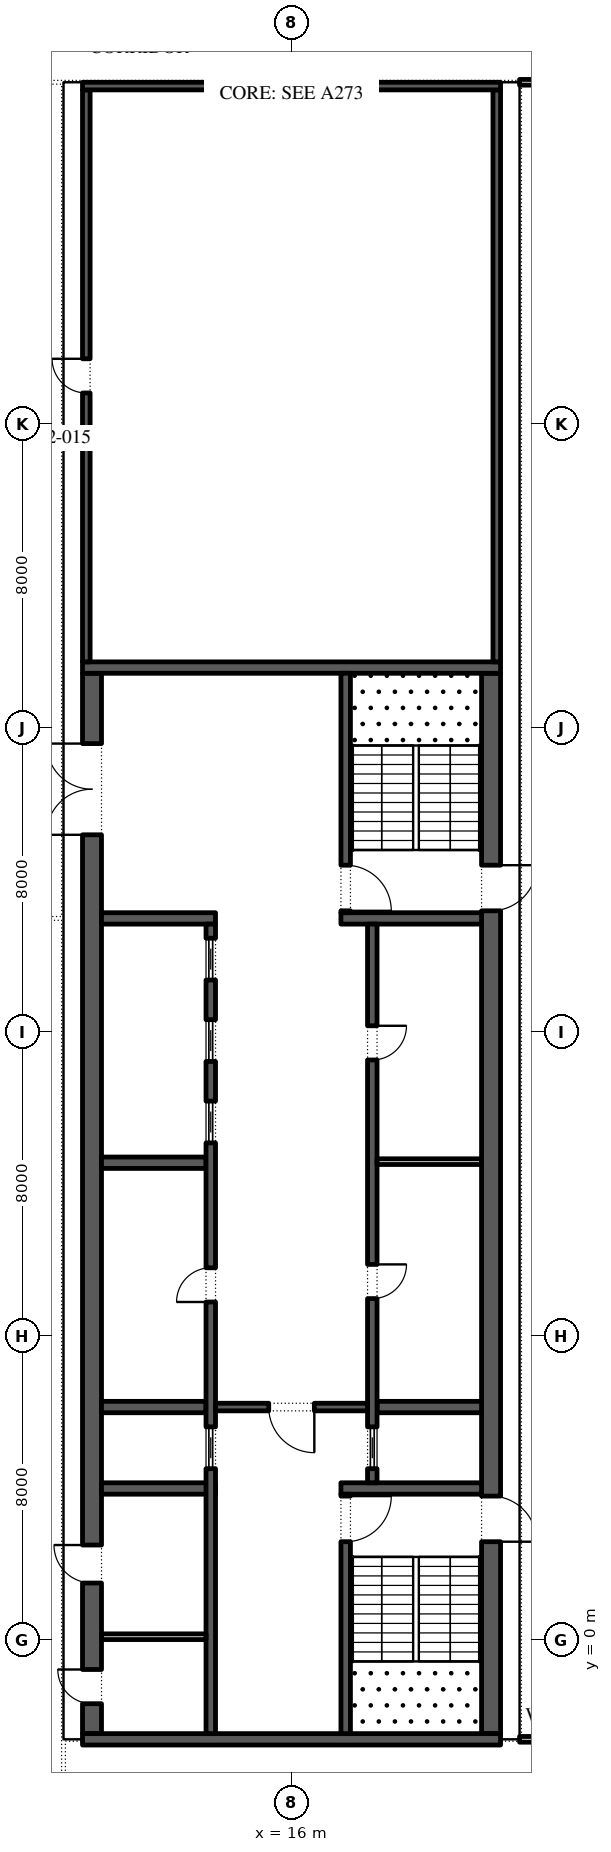
"""IFC4 building model, lengths in metres.
Left out: names, types, materials, properties, quantities, classifications, styles, units other than length and angle.
Written with IfcOpenShell. Run it as: python <this file> out.ifc"""

import sys

from ifc_helpers import new_model, si_unit, direction, frame, frame_2d, origin, place, context, subcontext, project, spatial, rectangle, extrude, element, fill, save


model = new_model("IFC4")
c1 = context("Model", 3, precision=1e-05, world=origin(), true_north=direction((0.0, 1.0)))
c2 = subcontext(c1, "Body", "Model", "MODEL_VIEW")
j1 = project(units=[si_unit("LENGTHUNIT", "METRE"), si_unit("PLANEANGLEUNIT", "RADIAN")], contexts=[c1])
p1 = place(None, origin())
s1 = spatial("IfcSite", under=j1, at=p1, CompositionType="ELEMENT")
p2 = place(p1, origin())
s2 = spatial("IfcBuilding", under=s1, at=p2, CompositionType="ELEMENT")
p3 = place(p2, frame((0.0, 0.0, 321.6)))
s3 = spatial("IfcBuildingStorey", under=s2, at=p3, CompositionType="ELEMENT", Elevation=321.6)
p4 = place(p3, frame((21.25, -2.45, 0.0), z_axis=(0.0, 0.0, 1.0), x_axis=(0.0, 1.0, 0.0)))
e1 = element("IfcWall", 1, at=p4, inside=s3, PredefinedType="SHEAR", context=c2, shape_type="SweptSolid", body=[
    extrude(rectangle(XDim=27.9, YDim=0.5, at=frame_2d((13.95, 0.0))), origin(), (0.0, 0.0, 1.0), 4.0),
])
p5 = place(p4, frame((5.05, 0.0, 0.0)))
e2 = element("IfcOpeningElement", 2, at=p5, cuts=e1, PredefinedType="OPENING", context=c2, shape_type="SweptSolid", body=[
    extrude(rectangle(XDim=1.2, YDim=2.1, at=frame_2d((0.6, 1.05))), frame((0.0, 0.26, 0.0), z_axis=(0.0, -1.0, 0.0), x_axis=(1.0, 0.0, 0.0)), (0.0, 0.0, 1.0), 0.52),
])
p6 = place(p4, frame((21.65, 0.0, 0.0)))
e3 = element("IfcOpeningElement", 3, at=p6, cuts=e1, PredefinedType="OPENING", context=c2, shape_type="SweptSolid", body=[
    extrude(rectangle(XDim=1.2, YDim=2.1, at=frame_2d((0.6, 1.05))), frame((0.0, 0.26, 0.0), z_axis=(0.0, -1.0, 0.0), x_axis=(1.0, 0.0, 0.0)), (0.0, 0.0, 1.0), 0.52),
])
p7 = place(p3, frame((10.75, -2.45, 0.0), z_axis=(0.0, 0.0, 1.0), x_axis=(0.0, 1.0, 0.0)))
e4 = element("IfcWall", 4, at=p7, inside=s3, PredefinedType="SHEAR", context=c2, shape_type="SweptSolid", body=[
    extrude(rectangle(XDim=27.9, YDim=0.5, at=frame_2d((13.95, 0.0))), origin(), (0.0, 0.0, 1.0), 4.0),
])
p8 = place(p7, frame((23.65, 0.0, 0.0)))
e5 = element("IfcOpeningElement", 5, at=p8, cuts=e4, PredefinedType="OPENING", context=c2, shape_type="SweptSolid", body=[
    extrude(rectangle(XDim=2.4, YDim=2.1, at=frame_2d((1.2, 1.05))), frame((0.0, 0.26, 0.0), z_axis=(0.0, -1.0, 0.0), x_axis=(1.0, 0.0, 0.0)), (0.0, 0.0, 1.0), 0.52),
])
p9 = place(p7, frame((0.788, 0.0, 0.0)))
e6 = element("IfcOpeningElement", 6, at=p9, cuts=e4, PredefinedType="OPENING", context=c2, shape_type="SweptSolid", body=[
    extrude(rectangle(XDim=0.9, YDim=2.1, at=frame_2d((0.45, 1.05))), frame((0.0, 0.26, 0.0), z_axis=(0.0, -1.0, 0.0), x_axis=(1.0, 0.0, 0.0)), (0.0, 0.0, 1.0), 0.52),
])
p10 = place(p7, frame((3.962, 0.0, 0.0)))
e7 = element("IfcOpeningElement", 7, at=p10, cuts=e4, PredefinedType="OPENING", context=c2, shape_type="SweptSolid", body=[
    extrude(rectangle(XDim=1.0, YDim=2.1, at=frame_2d((0.5, 1.05))), frame((0.0, 0.26, 0.0), z_axis=(0.0, -1.0, 0.0), x_axis=(1.0, 0.0, 0.0)), (0.0, 0.0, 1.0), 0.52),
])
for number, where, z_axis, x_axis in (
    (8, (10.5, -2.6, 0.0), (0.0, 0.0, 1.0), (1.0, 0.0, 0.0)),
    (9, (10.5, 25.6, 0.0), (0.0, 0.0, 1.0), (1.0, 0.0, 0.0)),
):
    element("IfcWall", number, at=place(p3, frame(where, z_axis=z_axis, x_axis=x_axis)), inside=s3, PredefinedType="SHEAR", context=c2, shape_type="SweptSolid", body=[
        extrude(rectangle(XDim=11.0, YDim=0.3, at=frame_2d((5.5, 0.0))), origin(), (0.0, 0.0, 1.0), 4.0),
    ])
p11 = place(p3, frame((17.3, 4.0, 0.0), z_axis=(0.0, 0.0, 1.0), x_axis=(1.0, 0.0, 0.0)))
e10 = element("IfcWall", 10, at=p11, inside=s3, PredefinedType="SHEAR", context=c2, shape_type="SweptSolid", body=[
    extrude(rectangle(XDim=3.7, YDim=0.3, at=frame_2d((1.85, 0.0))), origin(), (0.0, 0.0, 1.0), 4.0),
])
p12 = place(p3, frame((17.425, -2.45, 0.0), z_axis=(0.0, 0.0, 1.0), x_axis=(0.0, 1.0, 0.0)))
e11 = element("IfcWall", 11, at=p12, inside=s3, PredefinedType="SHEAR", context=c2, shape_type="SweptSolid", body=[
    extrude(rectangle(XDim=6.3, YDim=0.25, at=frame_2d((3.15, 0.0))), origin(), (0.0, 0.0, 1.0), 4.0),
])
p13 = place(p12, frame((5.05, 0.0, 0.0)))
e12 = element("IfcOpeningElement", 12, at=p13, cuts=e11, PredefinedType="OPENING", context=c2, shape_type="SweptSolid", body=[
    extrude(rectangle(XDim=1.2, YDim=2.1, at=frame_2d((0.6, 1.05))), frame((0.0, 0.135, 0.0), z_axis=(0.0, -1.0, 0.0), x_axis=(1.0, 0.0, 0.0)), (0.0, 0.0, 1.0), 0.27),
])
p14 = place(p3, frame((17.3, 19.0, 0.0), z_axis=(0.0, 0.0, 1.0), x_axis=(1.0, 0.0, 0.0)))
e13 = element("IfcWall", 13, at=p14, inside=s3, PredefinedType="SHEAR", context=c2, shape_type="SweptSolid", body=[
    extrude(rectangle(XDim=3.7, YDim=0.3, at=frame_2d((1.85, 0.0))), origin(), (0.0, 0.0, 1.0), 4.0),
])
p15 = place(p3, frame((17.425, 19.15, 0.0), z_axis=(0.0, 0.0, 1.0), x_axis=(0.0, 1.0, 0.0)))
e14 = element("IfcWall", 14, at=p15, inside=s3, PredefinedType="SHEAR", context=c2, shape_type="SweptSolid", body=[
    extrude(rectangle(XDim=6.3, YDim=0.25, at=frame_2d((3.15, 0.0))), origin(), (0.0, 0.0, 1.0), 4.0),
])
p16 = place(p15, frame((0.05, 0.0, 0.0)))
e15 = element("IfcOpeningElement", 15, at=p16, cuts=e14, PredefinedType="OPENING", context=c2, shape_type="SweptSolid", body=[
    extrude(rectangle(XDim=1.2, YDim=2.1, at=frame_2d((0.6, 1.05))), frame((0.0, 0.135, 0.0), z_axis=(0.0, -1.0, 0.0), x_axis=(1.0, 0.0, 0.0)), (0.0, 0.0, 1.0), 0.27),
])
p17 = place(p3, frame((18.25, 6.143, 0.0), z_axis=(0.0, 0.0, 1.0), x_axis=(1.0, 0.0, 0.0)))
e16 = element("IfcWall", 16, at=p17, inside=s3, PredefinedType="SHEAR", context=c2, shape_type="SweptSolid", body=[
    extrude(rectangle(XDim=2.75, YDim=0.3, at=frame_2d((1.375, 0.0))), origin(), (0.0, 0.0, 1.0), 4.0),
])
p18 = place(p3, frame((18.125, 4.15, 0.0), z_axis=(0.0, 0.0, 1.0), x_axis=(0.0, 1.0, 0.0)))
e17 = element("IfcWall", 17, at=p18, inside=s3, PredefinedType="SHEAR", context=c2, shape_type="SweptSolid", body=[
    extrude(rectangle(XDim=14.7, YDim=0.25, at=frame_2d((7.35, 0.0))), origin(), (0.0, 0.0, 1.0), 4.0),
])
p19 = place(p18, frame((4.846, 0.0, 0.0)))
e18 = element("IfcOpeningElement", 18, at=p19, cuts=e17, PredefinedType="OPENING", context=c2, shape_type="SweptSolid", body=[
    extrude(rectangle(XDim=0.9, YDim=2.1, at=frame_2d((0.45, 1.05))), frame((0.0, 0.135, 0.0), z_axis=(0.0, -1.0, 0.0), x_axis=(1.0, 0.0, 0.0)), (0.0, 0.0, 1.0), 0.27),
])
p20 = place(p18, frame((11.125, 0.0, 0.0)))
e19 = element("IfcOpeningElement", 19, at=p20, cuts=e17, PredefinedType="OPENING", context=c2, shape_type="SweptSolid", body=[
    extrude(rectangle(XDim=0.9, YDim=2.1, at=frame_2d((0.45, 1.05))), frame((0.0, 0.135, 0.0), z_axis=(0.0, -1.0, 0.0), x_axis=(1.0, 0.0, 0.0)), (0.0, 0.0, 1.0), 0.27),
])
p21 = place(p18, frame((0.371, 0.0, 0.0)))
e20 = element("IfcOpeningElement", 20, at=p21, cuts=e17, PredefinedType="OPENING", context=c2, shape_type="SweptSolid", body=[
    extrude(rectangle(XDim=1.1, YDim=2.1, at=frame_2d((0.55, 1.05))), frame((0.0, 0.135, 0.0), z_axis=(0.0, -1.0, 0.0), x_axis=(1.0, 0.0, 0.0)), (0.0, 0.0, 1.0), 0.27),
])
p22 = place(p3, frame((18.25, 12.6, 0.0), z_axis=(0.0, 0.0, 1.0), x_axis=(1.0, 0.0, 0.0)))
e21 = element("IfcWall", 21, at=p22, inside=s3, PredefinedType="PARTITIONING", context=c2, shape_type="SweptSolid", body=[
    extrude(rectangle(XDim=2.75, YDim=0.15, at=frame_2d((1.375, 0.0))), origin(), (0.0, 0.0, 1.0), 4.0),
])
p23 = place(p3, frame((11.0, 4.0, 0.0), z_axis=(0.0, 0.0, 1.0), x_axis=(1.0, 0.0, 0.0)))
e22 = element("IfcWall", 22, at=p23, inside=s3, PredefinedType="SHEAR", context=c2, shape_type="SweptSolid", body=[
    extrude(rectangle(XDim=3.0, YDim=0.3, at=frame_2d((1.5, 0.0))), origin(), (0.0, 0.0, 1.0), 4.0),
])
for number, where, z_axis, x_axis in (
    (23, (11.0, 6.143, 0.0), (0.0, 0.0, 1.0), (1.0, 0.0, 0.0)),
    (24, (11.0, 12.571, 0.0), (0.0, 0.0, 1.0), (1.0, 0.0, 0.0)),
):
    element("IfcWall", number, at=place(p3, frame(where, z_axis=z_axis, x_axis=x_axis)), inside=s3, PredefinedType="SHEAR", context=c2, shape_type="SweptSolid", body=[
        extrude(rectangle(XDim=2.75, YDim=0.3, at=frame_2d((1.375, 0.0))), origin(), (0.0, 0.0, 1.0), 4.0),
    ])
p24 = place(p3, frame((11.0, 19.0, 0.0), z_axis=(0.0, 0.0, 1.0), x_axis=(1.0, 0.0, 0.0)))
e25 = element("IfcWall", 25, at=p24, inside=s3, PredefinedType="SHEAR", context=c2, shape_type="SweptSolid", body=[
    extrude(rectangle(XDim=3.0, YDim=0.3, at=frame_2d((1.5, 0.0))), origin(), (0.0, 0.0, 1.0), 4.0),
])
p25 = place(p3, frame((13.875, -2.45, 0.0), z_axis=(0.0, 0.0, 1.0), x_axis=(0.0, 1.0, 0.0)))
e26 = element("IfcWall", 26, at=p25, inside=s3, PredefinedType="SHEAR", context=c2, shape_type="SweptSolid", body=[
    extrude(rectangle(XDim=21.3, YDim=0.25, at=frame_2d((10.65, 0.0))), origin(), (0.0, 0.0, 1.0), 4.0),
])
p26 = place(p25, frame((11.357, 0.0, 0.0)))
e27 = element("IfcOpeningElement", 27, at=p26, cuts=e26, PredefinedType="OPENING", context=c2, shape_type="SweptSolid", body=[
    extrude(rectangle(XDim=0.9, YDim=2.1, at=frame_2d((0.45, 1.05))), frame((0.0, 0.135, 0.0), z_axis=(0.0, -1.0, 0.0), x_axis=(1.0, 0.0, 0.0)), (0.0, 0.0, 1.0), 0.27),
])
p27 = place(p25, frame((6.971, 0.0, 0.0)))
e28 = element("IfcOpeningElement", 28, at=p27, cuts=e26, PredefinedType="OPENING", context=c2, shape_type="SweptSolid", body=[
    extrude(rectangle(XDim=1.1, YDim=2.1, at=frame_2d((0.55, 1.05))), frame((0.0, 0.135, 0.0), z_axis=(0.0, -1.0, 0.0), x_axis=(1.0, 0.0, 0.0)), (0.0, 0.0, 1.0), 0.27),
])
p28 = place(p25, frame((15.543, 0.0, 0.0)))
e29 = element("IfcOpeningElement", 29, at=p28, cuts=e26, PredefinedType="OPENING", context=c2, shape_type="SweptSolid", body=[
    extrude(rectangle(XDim=1.1, YDim=2.1, at=frame_2d((0.55, 1.05))), frame((0.0, 0.135, 0.0), z_axis=(0.0, -1.0, 0.0), x_axis=(1.0, 0.0, 0.0)), (0.0, 0.0, 1.0), 0.27),
])
p29 = place(p25, frame((17.686, 0.0, 0.0)))
e30 = element("IfcOpeningElement", 30, at=p29, cuts=e26, PredefinedType="OPENING", context=c2, shape_type="SweptSolid", body=[
    extrude(rectangle(XDim=1.1, YDim=2.1, at=frame_2d((0.55, 1.05))), frame((0.0, 0.135, 0.0), z_axis=(0.0, -1.0, 0.0), x_axis=(1.0, 0.0, 0.0)), (0.0, 0.0, 1.0), 0.27),
])
p30 = place(p25, frame((19.829, 0.0, 0.0)))
e31 = element("IfcOpeningElement", 31, at=p30, cuts=e26, PredefinedType="OPENING", context=c2, shape_type="SweptSolid", body=[
    extrude(rectangle(XDim=1.1, YDim=2.1, at=frame_2d((0.55, 1.05))), frame((0.0, 0.135, 0.0), z_axis=(0.0, -1.0, 0.0), x_axis=(1.0, 0.0, 0.0)), (0.0, 0.0, 1.0), 0.27),
])
p31 = place(p3, frame((14.0, 6.143, 0.0), z_axis=(0.0, 0.0, 1.0), x_axis=(1.0, 0.0, 0.0)))
e32 = element("IfcWall", 32, at=p31, inside=s3, PredefinedType="SHEAR", context=c2, shape_type="SweptSolid", body=[
    extrude(rectangle(XDim=4.0, YDim=0.2, at=frame_2d((2.0, 0.0))), origin(), (0.0, 0.0, 1.0), 4.0),
])
p32 = place(p31, frame((1.4, 0.0, 0.0)))
e33 = element("IfcOpeningElement", 33, at=p32, cuts=e32, PredefinedType="OPENING", context=c2, shape_type="SweptSolid", body=[
    extrude(rectangle(XDim=1.2, YDim=2.1, at=frame_2d((0.6, 1.05))), frame((0.0, 0.11, 0.0), z_axis=(0.0, -1.0, 0.0), x_axis=(1.0, 0.0, 0.0)), (0.0, 0.0, 1.0), 0.22),
])
p33 = place(p3, frame((11.0, 0.1, 0.0), z_axis=(0.0, 0.0, 1.0), x_axis=(1.0, 0.0, 0.0)))
e34 = element("IfcWall", 34, at=p33, inside=s3, PredefinedType="PARTITIONING", context=c2, shape_type="SweptSolid", body=[
    extrude(rectangle(XDim=2.75, YDim=0.15, at=frame_2d((1.375, 0.0))), origin(), (0.0, 0.0, 1.0), 4.0),
])
p34 = place(p3, frame((21.4, 25.75, 0.0), z_axis=(0.0, 0.0, 1.0), x_axis=(0.0, 1.0, 0.0)))
e35 = element("IfcWall", 35, at=p34, inside=s3, PredefinedType="SHEAR", context=c2, shape_type="SweptSolid", body=[
    extrude(rectangle(XDim=15.05, YDim=0.2, at=frame_2d((7.525, 0.0))), origin(), (0.0, 0.0, 1.0), 4.0),
])
p35 = place(p3, frame((10.6, 25.75, 0.0), z_axis=(0.0, 0.0, 1.0), x_axis=(0.0, 1.0, 0.0)))
e36 = element("IfcWall", 36, at=p35, inside=s3, PredefinedType="SHEAR", context=c2, shape_type="SweptSolid", body=[
    extrude(rectangle(XDim=15.05, YDim=0.2, at=frame_2d((7.525, 0.0))), origin(), (0.0, 0.0, 1.0), 4.0),
])
p36 = place(p35, frame((7.075, 0.0, 0.0)))
e37 = element("IfcOpeningElement", 37, at=p36, cuts=e36, PredefinedType="OPENING", context=c2, shape_type="SweptSolid", body=[
    extrude(rectangle(XDim=0.9, YDim=2.1, at=frame_2d((0.45, 1.05))), frame((0.0, 0.11, 0.0), z_axis=(0.0, -1.0, 0.0), x_axis=(1.0, 0.0, 0.0)), (0.0, 0.0, 1.0), 0.22),
])
p37 = place(p3, frame((10.5, 40.9, 0.0), z_axis=(0.0, 0.0, 1.0), x_axis=(1.0, 0.0, 0.0)))
e38 = element("IfcWall", 38, at=p37, inside=s3, PredefinedType="SHEAR", context=c2, shape_type="SweptSolid", body=[
    extrude(rectangle(XDim=11.0, YDim=0.2, at=frame_2d((5.5, 0.0))), origin(), (0.0, 0.0, 1.0), 4.0),
])
p38 = place(p3, frame((22.0, -2.6, 0.0), z_axis=(0.0, 0.0, 1.0), x_axis=(1.0, 0.0, 0.0)))
e39 = element("IfcWall", 39, at=p38, inside=s3, PredefinedType="PARTITIONING", context=c2, shape_type="SweptSolid", body=[
    extrude(rectangle(XDim=2.25, YDim=0.15, at=frame_2d((1.125, 0.0))), origin(), (0.0, 0.0, 1.0), 4.0),
])
p39 = place(p3, frame((26.05, 41.0, 0.0), z_axis=(0.0, 0.0, 1.0), x_axis=(-1.0, 0.0, 0.0)))
e40 = element("IfcWall", 40, at=p39, inside=s3, PredefinedType="PARTITIONING", context=c2, shape_type="SweptSolid", body=[
    extrude(rectangle(XDim=4.05, YDim=0.15, at=frame_2d((2.025, 0.0))), origin(), (0.0, 0.0, 1.0), 4.0),
])
p40 = place(p39, frame((0.9, 0.0, 0.0)))
e41 = element("IfcOpeningElement", 41, at=p40, cuts=e40, PredefinedType="OPENING", context=c2, shape_type="SweptSolid", body=[
    extrude(rectangle(XDim=1.0, YDim=2.1, at=frame_2d((0.5, 1.05))), frame((0.0, 0.085, 0.0), z_axis=(0.0, -1.0, 0.0), x_axis=(1.0, 0.0, 0.0)), (0.0, 0.0, 1.0), 0.17),
])
p41 = place(p19, frame((0.9, -0.2, 0.0), z_axis=(0.0, 0.0, 1.0), x_axis=(-1.0, 0.0, 0.0)))
e42 = element("IfcDoor", 42, at=p41, inside=s3, OperationType="SINGLE_SWING_RIGHT", PredefinedType="DOOR", context=c2, shape_type="SweptSolid", body=[
    extrude(rectangle(XDim=0.9, YDim=2.1, at=frame_2d((0.45, 1.05))), frame((0.0, -0.075, 0.0), z_axis=(0.0, -1.0, 0.0), x_axis=(1.0, 0.0, 0.0)), (0.0, 0.0, 1.0), 0.05),
])
fill(e18, e42)
p42 = place(p20, frame((0.9, -0.2, 0.0), z_axis=(0.0, 0.0, 1.0), x_axis=(-1.0, 0.0, 0.0)))
e43 = element("IfcDoor", 43, at=p42, inside=s3, OperationType="SINGLE_SWING_RIGHT", PredefinedType="DOOR", context=c2, shape_type="SweptSolid", body=[
    extrude(rectangle(XDim=0.9, YDim=2.1, at=frame_2d((0.45, 1.05))), frame((0.0, -0.075, 0.0), z_axis=(0.0, -1.0, 0.0), x_axis=(1.0, 0.0, 0.0)), (0.0, 0.0, 1.0), 0.05),
])
fill(e19, e43)
p43 = place(p21, origin())
e44 = element("IfcDoor", 44, at=p43, inside=s3, OperationType="SLIDING_TO_LEFT", PredefinedType="DOOR", context=c2, shape_type="SweptSolid", body=[
    extrude(rectangle(XDim=1.1, YDim=2.1, at=frame_2d((0.55, 1.05))), frame((0.0, 0.025, 0.0), z_axis=(0.0, -1.0, 0.0), x_axis=(1.0, 0.0, 0.0)), (0.0, 0.0, 1.0), 0.05),
])
fill(e20, e44)
p44 = place(p26, origin())
e45 = element("IfcDoor", 45, at=p44, inside=s3, OperationType="SINGLE_SWING_RIGHT", PredefinedType="DOOR", context=c2, shape_type="SweptSolid", body=[
    extrude(rectangle(XDim=0.9, YDim=2.1, at=frame_2d((0.45, 1.05))), frame((0.0, 0.125, 0.0), z_axis=(0.0, -1.0, 0.0), x_axis=(1.0, 0.0, 0.0)), (0.0, 0.0, 1.0), 0.05),
])
fill(e27, e45)
p45 = place(p27, origin())
e46 = element("IfcDoor", 46, at=p45, inside=s3, OperationType="SLIDING_TO_LEFT", PredefinedType="DOOR", context=c2, shape_type="SweptSolid", body=[
    extrude(rectangle(XDim=1.1, YDim=2.1, at=frame_2d((0.55, 1.05))), frame((0.0, 0.025, 0.0), z_axis=(0.0, -1.0, 0.0), x_axis=(1.0, 0.0, 0.0)), (0.0, 0.0, 1.0), 0.05),
])
fill(e28, e46)
p46 = place(p28, origin())
e47 = element("IfcDoor", 47, at=p46, inside=s3, OperationType="SLIDING_TO_LEFT", PredefinedType="DOOR", context=c2, shape_type="SweptSolid", body=[
    extrude(rectangle(XDim=1.1, YDim=2.1, at=frame_2d((0.55, 1.05))), frame((0.0, 0.025, 0.0), z_axis=(0.0, -1.0, 0.0), x_axis=(1.0, 0.0, 0.0)), (0.0, 0.0, 1.0), 0.05),
])
fill(e29, e47)
p47 = place(p29, origin())
e48 = element("IfcDoor", 48, at=p47, inside=s3, OperationType="SLIDING_TO_LEFT", PredefinedType="DOOR", context=c2, shape_type="SweptSolid", body=[
    extrude(rectangle(XDim=1.1, YDim=2.1, at=frame_2d((0.55, 1.05))), frame((0.0, 0.025, 0.0), z_axis=(0.0, -1.0, 0.0), x_axis=(1.0, 0.0, 0.0)), (0.0, 0.0, 1.0), 0.05),
])
fill(e30, e48)
p48 = place(p30, origin())
e49 = element("IfcDoor", 49, at=p48, inside=s3, OperationType="SLIDING_TO_LEFT", PredefinedType="DOOR", context=c2, shape_type="SweptSolid", body=[
    extrude(rectangle(XDim=1.1, YDim=2.1, at=frame_2d((0.55, 1.05))), frame((0.0, 0.025, 0.0), z_axis=(0.0, -1.0, 0.0), x_axis=(1.0, 0.0, 0.0)), (0.0, 0.0, 1.0), 0.05),
])
fill(e31, e49)
p49 = place(p32, frame((1.2, 0.0, 0.0), z_axis=(0.0, 0.0, 1.0), x_axis=(-1.0, 0.0, 0.0)))
e50 = element("IfcDoor", 50, at=p49, inside=s3, OperationType="SINGLE_SWING_RIGHT", PredefinedType="DOOR", context=c2, shape_type="SweptSolid", body=[
    extrude(rectangle(XDim=1.2, YDim=2.1, at=frame_2d((0.6, 1.05))), frame((0.0, 0.025, 0.0), z_axis=(0.0, -1.0, 0.0), x_axis=(1.0, 0.0, 0.0)), (0.0, 0.0, 1.0), 0.05),
])
fill(e33, e50)
p50 = place(p8, origin())
e51 = element("IfcDoor", 51, at=p50, inside=s3, OperationType="DOUBLE_DOOR_SINGLE_SWING", PredefinedType="DOOR", context=c2, shape_type="SweptSolid", body=[
    extrude(rectangle(XDim=2.4, YDim=2.1, at=frame_2d((1.2, 1.05))), frame((0.0, 0.025, 0.0), z_axis=(0.0, -1.0, 0.0), x_axis=(1.0, 0.0, 0.0)), (0.0, 0.0, 1.0), 0.05),
])
fill(e5, e51)
p51 = place(p13, frame((1.2, 0.0, 0.0), z_axis=(0.0, 0.0, 1.0), x_axis=(-1.0, 0.0, 0.0)))
e52 = element("IfcDoor", 52, at=p51, inside=s3, OperationType="SINGLE_SWING_RIGHT", PredefinedType="DOOR", context=c2, shape_type="SweptSolid", body=[
    extrude(rectangle(XDim=1.2, YDim=2.1, at=frame_2d((0.6, 1.05))), frame((0.0, 0.025, 0.0), z_axis=(0.0, -1.0, 0.0), x_axis=(1.0, 0.0, 0.0)), (0.0, 0.0, 1.0), 0.05),
])
fill(e12, e52)
p52 = place(p5, frame((1.2, 0.0, 0.0), z_axis=(0.0, 0.0, 1.0), x_axis=(-1.0, 0.0, 0.0)))
e53 = element("IfcDoor", 53, at=p52, inside=s3, OperationType="SINGLE_SWING_LEFT", PredefinedType="DOOR", context=c2, shape_type="SweptSolid", body=[
    extrude(rectangle(XDim=1.2, YDim=2.1, at=frame_2d((0.6, 1.05))), frame((0.0, 0.025, 0.0), z_axis=(0.0, -1.0, 0.0), x_axis=(1.0, 0.0, 0.0)), (0.0, 0.0, 1.0), 0.05),
])
fill(e2, e53)
p53 = place(p16, frame((1.2, 0.0, 0.0), z_axis=(0.0, 0.0, 1.0), x_axis=(-1.0, 0.0, 0.0)))
e54 = element("IfcDoor", 54, at=p53, inside=s3, OperationType="SINGLE_SWING_LEFT", PredefinedType="DOOR", context=c2, shape_type="SweptSolid", body=[
    extrude(rectangle(XDim=1.2, YDim=2.1, at=frame_2d((0.6, 1.05))), frame((0.0, 0.025, 0.0), z_axis=(0.0, -1.0, 0.0), x_axis=(1.0, 0.0, 0.0)), (0.0, 0.0, 1.0), 0.05),
])
fill(e15, e54)
p54 = place(p6, frame((1.2, 0.0, 0.0), z_axis=(0.0, 0.0, 1.0), x_axis=(-1.0, 0.0, 0.0)))
e55 = element("IfcDoor", 55, at=p54, inside=s3, OperationType="SINGLE_SWING_RIGHT", PredefinedType="DOOR", context=c2, shape_type="SweptSolid", body=[
    extrude(rectangle(XDim=1.2, YDim=2.1, at=frame_2d((0.6, 1.05))), frame((0.0, 0.025, 0.0), z_axis=(0.0, -1.0, 0.0), x_axis=(1.0, 0.0, 0.0)), (0.0, 0.0, 1.0), 0.05),
])
fill(e3, e55)
p55 = place(p9, origin())
e56 = element("IfcDoor", 56, at=p55, inside=s3, OperationType="SINGLE_SWING_LEFT", PredefinedType="DOOR", context=c2, shape_type="SweptSolid", body=[
    extrude(rectangle(XDim=0.9, YDim=2.1, at=frame_2d((0.45, 1.05))), frame((0.0, -0.2, 0.0), z_axis=(0.0, -1.0, 0.0), x_axis=(1.0, 0.0, 0.0)), (0.0, 0.0, 1.0), 0.05),
])
fill(e6, e56)
p56 = place(p10, origin())
e57 = element("IfcDoor", 57, at=p56, inside=s3, OperationType="SINGLE_SWING_LEFT", PredefinedType="DOOR", context=c2, shape_type="SweptSolid", body=[
    extrude(rectangle(XDim=1.0, YDim=2.1, at=frame_2d((0.5, 1.05))), frame((0.0, -0.2, 0.0), z_axis=(0.0, -1.0, 0.0), x_axis=(1.0, 0.0, 0.0)), (0.0, 0.0, 1.0), 0.05),
])
fill(e7, e57)
p57 = place(p36, origin())
e58 = element("IfcDoor", 58, at=p57, inside=s3, OperationType="SINGLE_SWING_LEFT", PredefinedType="DOOR", context=c2, shape_type="SweptSolid", body=[
    extrude(rectangle(XDim=0.9, YDim=2.1, at=frame_2d((0.45, 1.05))), frame((0.0, -0.05, 0.0), z_axis=(0.0, -1.0, 0.0), x_axis=(1.0, 0.0, 0.0)), (0.0, 0.0, 1.0), 0.05),
])
fill(e37, e58)
save(model, sys.argv[1])
